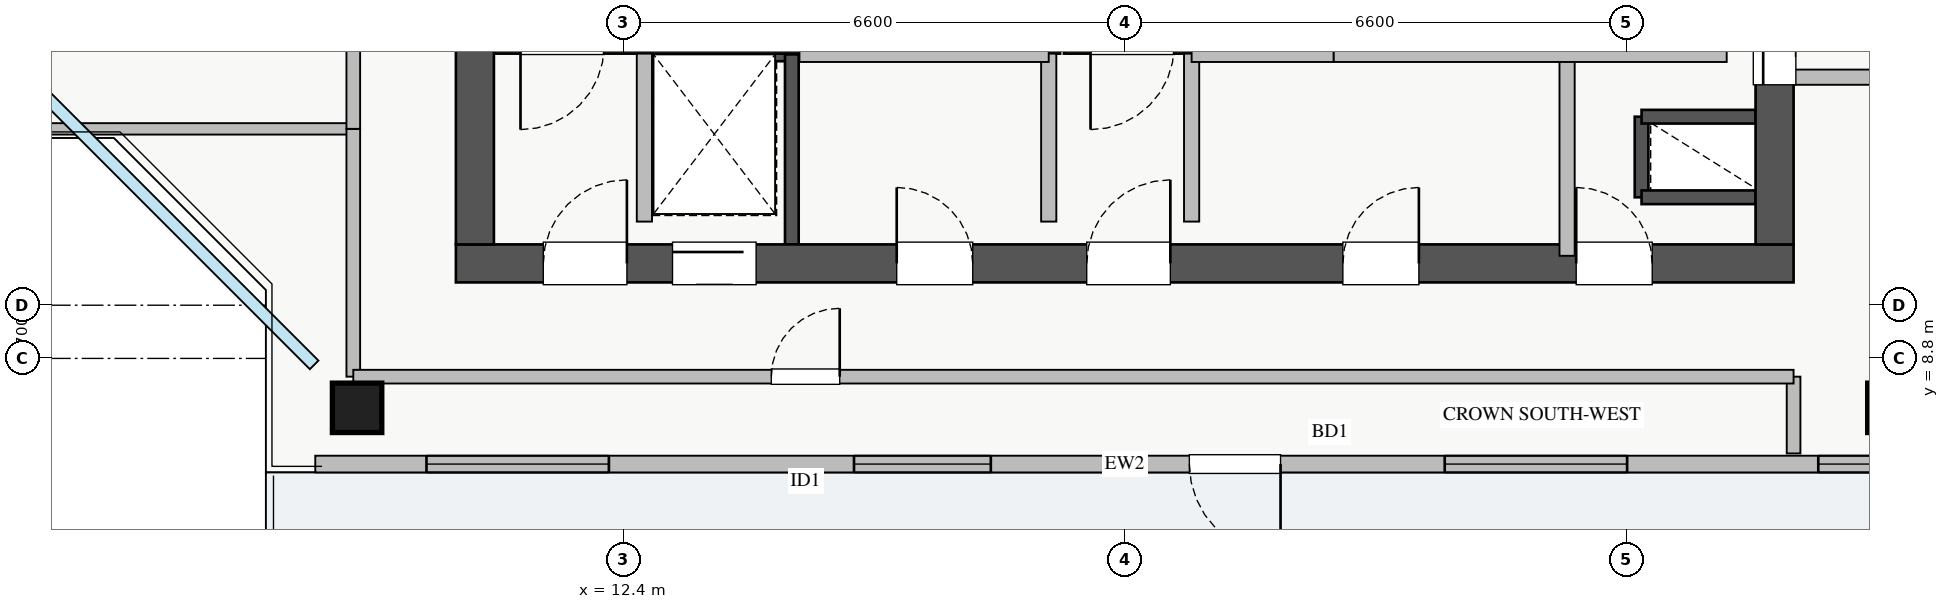
"""IFC4 building model, lengths in metres.
Left out: names, types, materials, properties, quantities, classifications, styles, units other than length and angle.
Written with IfcOpenShell. Run it as: python <this file> out.ifc"""

import sys

from ifc_helpers import new_model, si_unit, direction, frame, frame_2d, origin, origin_2d, place, context, subcontext, project, spatial, rectangle, extrude, source, transform, mapped, element, fill, save


model = new_model("IFC4")
c1 = context("Model", 3, precision=1e-05, world=origin(), true_north=direction((0.0, 1.0)))
c2 = subcontext(c1, "Body", "Model", "MODEL_VIEW")
j1 = project(units=[si_unit("LENGTHUNIT", "METRE"), si_unit("PLANEANGLEUNIT", "RADIAN")], contexts=[c1])
p1 = place(None, origin())
s1 = spatial("IfcSite", under=j1, at=p1, CompositionType="ELEMENT")
p2 = place(p1, origin())
s2 = spatial("IfcBuilding", under=s1, at=p2, CompositionType="ELEMENT")
p3 = place(p2, frame((0.0, 0.0, 237.25)))
s3 = spatial("IfcBuildingStorey", under=s2, at=p3, CompositionType="ELEMENT", Elevation=237.25)
p4 = place(p3, frame((12.68, 12.8, 0.0), z_axis=(0.0, 0.0, 1.0), x_axis=(1.0, 0.0, 0.0)))
e1 = element("IfcWall", 1, at=p4, inside=s3, PredefinedType="SHEAR", context=c2, shape_type="SweptSolid", body=[
    extrude(rectangle(XDim=1.94, YDim=0.18, at=frame_2d((0.97, 0.0))), origin(), (0.0, 0.0, 1.0), 3.07),
])
p5 = place(p3, frame((14.62, 10.3, 0.0), z_axis=(0.0, 0.0, 1.0), x_axis=(0.0, 1.0, 0.0)))
e2 = element("IfcWall", 2, at=p5, inside=s3, PredefinedType="SHEAR", context=c2, shape_type="SweptSolid", body=[
    extrude(rectangle(XDim=2.5, YDim=0.18, at=frame_2d((1.25, 0.0))), origin(), (0.0, 0.0, 1.0), 3.07),
])
p6 = place(p3, frame((25.8, 10.92, 0.0), z_axis=(0.0, 0.0, 1.0), x_axis=(0.0, 1.0, 0.0)))
e3 = element("IfcWall", 3, at=p6, inside=s3, PredefinedType="SHEAR", context=c2, shape_type="SweptSolid", body=[
    extrude(rectangle(XDim=1.06, YDim=0.18, at=frame_2d((0.53, 0.0))), origin(), (0.0, 0.0, 1.0), 3.07),
])
for number, where, z_axis, x_axis in (
    (4, (25.8, 11.98, 0.0), (0.0, 0.0, 1.0), (1.0, 0.0, 0.0)),
    (5, (25.8, 10.92, 0.0), (0.0, 0.0, 1.0), (1.0, 0.0, 0.0)),
):
    element("IfcWall", number, at=place(p3, frame(where, z_axis=z_axis, x_axis=x_axis)), inside=s3, PredefinedType="SHEAR", context=c2, shape_type="SweptSolid", body=[
        extrude(rectangle(XDim=1.5, YDim=0.18, at=frame_2d((0.75, 0.0))), origin(), (0.0, 0.0, 1.0), 3.07),
    ])
p7 = place(p3, frame((10.7, 12.91, 0.0), z_axis=(0.0, 0.0, 1.0), x_axis=(1.0, 0.0, 0.0)))
e6 = element("IfcWall", 6, at=p7, inside=s3, PredefinedType="SHEAR", context=c2, shape_type="SweptSolid", body=[
    extrude(rectangle(XDim=7.45, YDim=0.2, at=frame_2d((3.725, 0.0))), origin(), (0.0, 0.0, 1.0), 3.25),
])
p8 = place(p7, frame((0.35, 0.0, 0.0)))
e7 = element("IfcOpeningElement", 7, at=p8, cuts=e6, PredefinedType="OPENING", context=c2, shape_type="SweptSolid", body=[
    extrude(rectangle(XDim=1.1, YDim=2.05, at=frame_2d((0.55, 1.025))), frame((0.0, 0.11, 0.0), z_axis=(0.0, -1.0, 0.0), x_axis=(1.0, 0.0, 0.0)), (0.0, 0.0, 1.0), 0.22),
])
p9 = place(p3, frame((18.2, 12.91, 0.0), z_axis=(0.0, 0.0, 1.0), x_axis=(1.0, 0.0, 0.0)))
e8 = element("IfcWall", 8, at=p9, inside=s3, PredefinedType="SHEAR", context=c2, shape_type="SweptSolid", body=[
    extrude(rectangle(XDim=7.15, YDim=0.2, at=frame_2d((3.575, 0.0))), origin(), (0.0, 0.0, 1.0), 3.25),
])
p10 = place(p9, frame((0.35, 0.0, 0.0)))
e9 = element("IfcOpeningElement", 9, at=p10, cuts=e8, PredefinedType="OPENING", context=c2, shape_type="SweptSolid", body=[
    extrude(rectangle(XDim=1.1, YDim=2.05, at=frame_2d((0.55, 1.025))), frame((0.0, 0.11, 0.0), z_axis=(0.0, -1.0, 0.0), x_axis=(1.0, 0.0, 0.0)), (0.0, 0.0, 1.0), 0.22),
])
p11 = place(p3, frame((10.2, 10.05, 0.0), z_axis=(0.0, 0.0, 1.0), x_axis=(1.0, 0.0, 0.0)))
e10 = element("IfcWall", 10, at=p11, inside=s3, PredefinedType="SHEAR", context=c2, shape_type="SweptSolid", body=[
    extrude(rectangle(XDim=17.6, YDim=0.5, at=frame_2d((8.8, 0.0))), origin(), (0.0, 0.0, 1.0), 3.25),
])
p12 = place(p11, frame((1.15, 0.0, 0.0)))
e11 = element("IfcOpeningElement", 11, at=p12, cuts=e10, PredefinedType="OPENING", context=c2, shape_type="SweptSolid", body=[
    extrude(rectangle(XDim=1.1, YDim=2.05, at=frame_2d((0.55, 1.025))), frame((0.0, 0.26, 0.0), z_axis=(0.0, -1.0, 0.0), x_axis=(1.0, 0.0, 0.0)), (0.0, 0.0, 1.0), 0.52),
])
p13 = place(p11, frame((8.3, 0.0, 0.0)))
e12 = element("IfcOpeningElement", 12, at=p13, cuts=e10, PredefinedType="OPENING", context=c2, shape_type="SweptSolid", body=[
    extrude(rectangle(XDim=1.1, YDim=2.05, at=frame_2d((0.55, 1.025))), frame((0.0, 0.26, 0.0), z_axis=(0.0, -1.0, 0.0), x_axis=(1.0, 0.0, 0.0)), (0.0, 0.0, 1.0), 0.52),
])
p14 = place(p11, frame((2.85, 0.0, 0.0)))
e13 = element("IfcOpeningElement", 13, at=p14, cuts=e10, PredefinedType="OPENING", context=c2, shape_type="SweptSolid", body=[
    extrude(rectangle(XDim=1.1, YDim=2.05, at=frame_2d((0.55, 1.025))), frame((0.0, 0.26, 0.0), z_axis=(0.0, -1.0, 0.0), x_axis=(1.0, 0.0, 0.0)), (0.0, 0.0, 1.0), 0.52),
])
p15 = place(p11, frame((5.8, 0.0, 0.0)))
e14 = element("IfcOpeningElement", 14, at=p15, cuts=e10, PredefinedType="OPENING", context=c2, shape_type="SweptSolid", body=[
    extrude(rectangle(XDim=1.0, YDim=2.05, at=frame_2d((0.5, 1.025))), frame((0.0, 0.26, 0.0), z_axis=(0.0, -1.0, 0.0), x_axis=(1.0, 0.0, 0.0)), (0.0, 0.0, 1.0), 0.52),
])
p16 = place(p11, frame((14.74, 0.0, 0.0)))
e15 = element("IfcOpeningElement", 15, at=p16, cuts=e10, PredefinedType="OPENING", context=c2, shape_type="SweptSolid", body=[
    extrude(rectangle(XDim=1.0, YDim=2.05, at=frame_2d((0.5, 1.025))), frame((0.0, 0.26, 0.0), z_axis=(0.0, -1.0, 0.0), x_axis=(1.0, 0.0, 0.0)), (0.0, 0.0, 1.0), 0.52),
])
p17 = place(p11, frame((11.67, 0.0, 0.0)))
e16 = element("IfcOpeningElement", 16, at=p17, cuts=e10, PredefinedType="OPENING", context=c2, shape_type="SweptSolid", body=[
    extrude(rectangle(XDim=1.0, YDim=2.05, at=frame_2d((0.5, 1.025))), frame((0.0, 0.26, 0.0), z_axis=(0.0, -1.0, 0.0), x_axis=(1.0, 0.0, 0.0)), (0.0, 0.0, 1.0), 0.52),
])
p18 = place(p3, frame((10.45, 10.3, 0.0), z_axis=(0.0, 0.0, 1.0), x_axis=(0.0, 1.0, 0.0)))
e17 = element("IfcWall", 17, at=p18, inside=s3, PredefinedType="SHEAR", context=c2, shape_type="SweptSolid", body=[
    extrude(rectangle(XDim=6.2, YDim=0.5, at=frame_2d((3.1, 0.0))), origin(), (0.0, 0.0, 1.0), 3.25),
])
p19 = place(p3, frame((27.55, 10.3, 0.0), z_axis=(0.0, 0.0, 1.0), x_axis=(0.0, 1.0, 0.0)))
e18 = element("IfcWall", 18, at=p19, inside=s3, PredefinedType="SHEAR", context=c2, shape_type="SweptSolid", body=[
    extrude(rectangle(XDim=6.2, YDim=0.5, at=frame_2d((3.1, 0.0))), origin(), (0.0, 0.0, 1.0), 3.25),
])
p20 = place(p19, frame((2.1, 0.0, 0.0)))
e19 = element("IfcOpeningElement", 19, at=p20, cuts=e18, PredefinedType="OPENING", context=c2, shape_type="SweptSolid", body=[
    extrude(rectangle(XDim=1.3, YDim=2.05, at=frame_2d((0.65, 1.025))), frame((0.0, 0.26, 0.0), z_axis=(0.0, -1.0, 0.0), x_axis=(1.0, 0.0, 0.0)), (0.0, 0.0, 1.0), 0.52),
])
m1 = source(origin(), c2, "Body", "SweptSolid", [
    extrude(rectangle(XDim=0.65, YDim=0.65, at=origin_2d()), origin(), (0.0, 0.0, 1.0), 3.25),
])
for number, where, z_axis, x_axis in (
    (20, (8.9, 8.15, 0.0), (0.0, 0.0, 1.0), (1.0, 0.0, 0.0)),
    (21, (29.1, 8.15, 0.0), (0.0, 0.0, 1.0), (1.0, 0.0, 0.0)),
):
    element("IfcColumn", number, at=place(p3, frame(where, z_axis=z_axis, x_axis=x_axis)), inside=s3, PredefinedType="COLUMN", context=c2, shape_type="MappedRepresentation", body=[
        mapped(m1, transform((0.0, 0.0, 0.0), x_axis=(1.0, 0.0, 0.0), y_axis=(0.0, 1.0, 0.0), z_axis=(0.0, 0.0, 1.0), scale=1.0)),
    ])
p21 = place(p3, frame((8.35, 7.41, 0.0), z_axis=(0.0, 0.0, 1.0), x_axis=(1.0, 0.0, 0.0)))
e22 = element("IfcWall", 22, at=p21, inside=s3, PredefinedType="STANDARD", context=c2, shape_type="SweptSolid", body=[
    extrude(rectangle(XDim=21.3, YDim=0.22, at=frame_2d((10.65, 0.0))), origin(), (0.0, 0.0, 1.0), 2.61),
])
p22 = place(p21, frame((11.5, 0.0, 0.0)))
e23 = element("IfcOpeningElement", 23, at=p22, cuts=e22, PredefinedType="OPENING", context=c2, shape_type="SweptSolid", body=[
    extrude(rectangle(XDim=1.2, YDim=2.1, at=frame_2d((0.6, 1.05))), frame((0.0, 0.12, 0.0), z_axis=(0.0, -1.0, 0.0), x_axis=(1.0, 0.0, 0.0)), (0.0, 0.0, 1.0), 0.24),
])
p23 = place(p21, frame((1.463, 0.0, 0.9)))
e24 = element("IfcOpeningElement", 24, at=p23, cuts=e22, PredefinedType="OPENING", context=c2, shape_type="SweptSolid", body=[
    extrude(rectangle(XDim=2.4, YDim=1.48, at=frame_2d((1.2, 0.74))), frame((0.0, 0.12, 0.0), z_axis=(0.0, -1.0, 0.0), x_axis=(1.0, 0.0, 0.0)), (0.0, 0.0, 1.0), 0.24),
])
p24 = place(p21, frame((7.088, 0.0, 0.9)))
e25 = element("IfcOpeningElement", 25, at=p24, cuts=e22, PredefinedType="OPENING", context=c2, shape_type="SweptSolid", body=[
    extrude(rectangle(XDim=1.8, YDim=1.45, at=frame_2d((0.9, 0.725))), frame((0.0, 0.12, 0.0), z_axis=(0.0, -1.0, 0.0), x_axis=(1.0, 0.0, 0.0)), (0.0, 0.0, 1.0), 0.24),
])
p25 = place(p21, frame((19.775, 0.0, 0.9)))
e26 = element("IfcOpeningElement", 26, at=p25, cuts=e22, PredefinedType="OPENING", context=c2, shape_type="SweptSolid", body=[
    extrude(rectangle(XDim=1.2, YDim=1.4, at=frame_2d((0.6, 0.7))), frame((0.0, 0.12, 0.0), z_axis=(0.0, -1.0, 0.0), x_axis=(1.0, 0.0, 0.0)), (0.0, 0.0, 1.0), 0.24),
])
p26 = place(p21, frame((14.86, 0.0, 0.9)))
e27 = element("IfcOpeningElement", 27, at=p26, cuts=e22, PredefinedType="OPENING", context=c2, shape_type="SweptSolid", body=[
    extrude(rectangle(XDim=2.4, YDim=1.5, at=frame_2d((1.2, 0.75))), frame((0.0, 0.12, 0.0), z_axis=(0.0, -1.0, 0.0), x_axis=(1.0, 0.0, 0.0)), (0.0, 0.0, 1.0), 0.24),
])
p27 = place(p3, frame((27.8, 12.5, 0.0), z_axis=(0.0, 0.0, 1.0), x_axis=(1.0, 0.0, 0.0)))
e28 = element("IfcWall", 28, at=p27, inside=s3, PredefinedType="PARTITIONING", context=c2, shape_type="SweptSolid", body=[
    extrude(rectangle(XDim=3.1, YDim=0.2, at=frame_2d((1.55, 0.0))), origin(), (0.0, 0.0, 1.0), 3.07),
])
for number, where, z_axis, x_axis in (
    (29, (12.68, 10.6, 0.0), (0.0, 0.0, 1.0), (0.0, 1.0, 0.0)),
    (30, (18.0, 10.6, 0.0), (0.0, 0.0, 1.0), (0.0, 1.0, 0.0)),
    (31, (19.88, 10.6, 0.0), (0.0, 0.0, 1.0), (0.0, 1.0, 0.0)),
):
    element("IfcWall", number, at=place(p3, frame(where, z_axis=z_axis, x_axis=x_axis)), inside=s3, PredefinedType="PARTITIONING", context=c2, shape_type="SweptSolid", body=[
        extrude(rectangle(XDim=2.21, YDim=0.2, at=frame_2d((1.105, 0.0))), origin(), (0.0, 0.0, 1.0), 3.07),
    ])
p28 = place(p3, frame((14.72, 12.8, 0.0), z_axis=(0.0, 0.0, 1.0), x_axis=(1.0, 0.0, 0.0)))
e32 = element("IfcWall", 32, at=p28, inside=s3, PredefinedType="PARTITIONING", context=c2, shape_type="SweptSolid", body=[
    extrude(rectangle(XDim=3.28, YDim=0.2, at=frame_2d((1.64, 0.0))), origin(), (0.0, 0.0, 1.0), 3.07),
])
p29 = place(p3, frame((24.82, 10.15, 0.0), z_axis=(0.0, 0.0, 1.0), x_axis=(0.0, 1.0, 0.0)))
e33 = element("IfcWall", 33, at=p29, inside=s3, PredefinedType="PARTITIONING", context=c2, shape_type="SweptSolid", body=[
    extrude(rectangle(XDim=2.65, YDim=0.2, at=frame_2d((1.325, 0.0))), origin(), (0.0, 0.0, 1.0), 3.07),
])
p30 = place(p3, frame((19.88, 12.8, 0.0), z_axis=(0.0, 0.0, 1.0), x_axis=(1.0, 0.0, 0.0)))
e34 = element("IfcWall", 34, at=p30, inside=s3, PredefinedType="PARTITIONING", context=c2, shape_type="SweptSolid", body=[
    extrude(rectangle(XDim=1.87, YDim=0.2, at=frame_2d((0.935, 0.0))), origin(), (0.0, 0.0, 1.0), 3.07),
])
p31 = place(p3, frame((21.75, 12.8, 0.0), z_axis=(0.0, 0.0, 1.0), x_axis=(1.0, 0.0, 0.0)))
e35 = element("IfcWall", 35, at=p31, inside=s3, PredefinedType="PARTITIONING", context=c2, shape_type="SweptSolid", body=[
    extrude(rectangle(XDim=5.17, YDim=0.2, at=frame_2d((2.585, 0.0))), origin(), (0.0, 0.0, 1.0), 3.07),
])
p32 = place(p3, frame((3.55, 11.82, 0.0), z_axis=(0.0, 0.0, 1.0), x_axis=(1.0, 0.0, 0.0)))
e36 = element("IfcWall", 36, at=p32, inside=s3, PredefinedType="PARTITIONING", context=c2, shape_type="SweptSolid", body=[
    extrude(rectangle(XDim=5.3, YDim=0.15, at=frame_2d((2.65, 0.0))), origin(), (0.0, 0.0, 1.0), 3.07),
])
p33 = place(p3, frame((27.8, 7.55, 0.0), z_axis=(0.0, 0.0, 1.0), x_axis=(0.0, 1.0, 0.0)))
e37 = element("IfcWall", 37, at=p33, inside=s3, PredefinedType="PARTITIONING", context=c2, shape_type="SweptSolid", body=[
    extrude(rectangle(XDim=1.01, YDim=0.18, at=frame_2d((0.505, 0.0))), origin(), (0.0, 0.0, 1.0), 3.07),
])
p34 = place(p3, frame((8.85, 8.56, 0.0), z_axis=(0.0, 0.0, 1.0), x_axis=(0.0, 1.0, 0.0)))
e38 = element("IfcWall", 38, at=p34, inside=s3, PredefinedType="PARTITIONING", context=c2, shape_type="SweptSolid", body=[
    extrude(rectangle(XDim=3.26, YDim=0.18, at=frame_2d((1.63, 0.0))), origin(), (0.0, 0.0, 1.0), 2.569),
])
p35 = place(p3, frame((8.85, 8.56, 0.0), z_axis=(0.0, 0.0, 1.0), x_axis=(1.0, 0.0, 0.0)))
e39 = element("IfcWall", 39, at=p35, inside=s3, PredefinedType="PARTITIONING", context=c2, shape_type="SweptSolid", body=[
    extrude(rectangle(XDim=18.95, YDim=0.18, at=frame_2d((9.475, 0.0))), origin(), (0.0, 0.0, 1.0), 3.07),
])
p36 = place(p35, frame((5.5, 0.0, 0.0)))
e40 = element("IfcOpeningElement", 40, at=p36, cuts=e39, PredefinedType="OPENING", context=c2, shape_type="SweptSolid", body=[
    extrude(rectangle(XDim=0.9, YDim=2.05, at=frame_2d((0.45, 1.025))), frame((0.0, 0.1, 0.0), z_axis=(0.0, -1.0, 0.0), x_axis=(1.0, 0.0, 0.0)), (0.0, 0.0, 1.0), 0.2),
])
p37 = place(p3, frame((8.85, 11.82, 0.0), z_axis=(0.0, 0.0, 1.0), x_axis=(0.0, 1.0, 0.0)))
e41 = element("IfcWall", 41, at=p37, inside=s3, PredefinedType="PARTITIONING", context=c2, shape_type="SweptSolid", body=[
    extrude(rectangle(XDim=22.36, YDim=0.18, at=frame_2d((11.18, 0.0))), origin(), (0.0, 0.0, 1.0), 2.569),
])
p38 = place(p37, frame((4.42, 0.0, 0.0)))
e42 = element("IfcOpeningElement", 42, at=p38, cuts=e41, PredefinedType="OPENING", context=c2, shape_type="SweptSolid", body=[
    extrude(rectangle(XDim=1.0, YDim=2.05, at=frame_2d((0.5, 1.025))), frame((0.0, 0.1, 0.0), z_axis=(0.0, -1.0, 0.0), x_axis=(1.0, 0.0, 0.0)), (0.0, 0.0, 1.0), 0.2),
])
p39 = place(p37, frame((12.695, 0.0, 0.0)))
e43 = element("IfcOpeningElement", 43, at=p39, cuts=e41, PredefinedType="OPENING", context=c2, shape_type="SweptSolid", body=[
    extrude(rectangle(XDim=1.0, YDim=2.05, at=frame_2d((0.5, 1.025))), frame((0.0, 0.1, 0.0), z_axis=(0.0, -1.0, 0.0), x_axis=(1.0, 0.0, 0.0)), (0.0, 0.0, 1.0), 0.2),
])
p40 = place(p37, frame((18.955, 0.0, 0.0)))
e44 = element("IfcOpeningElement", 44, at=p40, cuts=e41, PredefinedType="OPENING", context=c2, shape_type="SweptSolid", body=[
    extrude(rectangle(XDim=1.0, YDim=2.05, at=frame_2d((0.5, 1.025))), frame((0.0, 0.1, 0.0), z_axis=(0.0, -1.0, 0.0), x_axis=(1.0, 0.0, 0.0)), (0.0, 0.0, 1.0), 0.2),
])
m2 = source(origin(), c2, "Body", "SweptSolid", [
    extrude(rectangle(XDim=1.2, YDim=2.1, at=frame_2d((0.6, 1.05))), frame((0.0, 0.025, 0.0), z_axis=(0.0, -1.0, 0.0), x_axis=(1.0, 0.0, 0.0)), (0.0, 0.0, 1.0), 0.05),
])
p41 = place(p22, frame((1.2, 0.0, 0.0), z_axis=(0.0, 0.0, 1.0), x_axis=(-1.0, 0.0, 0.0)))
e45 = element("IfcDoor", 45, at=p41, inside=s3, OperationType="SINGLE_SWING_RIGHT", PredefinedType="DOOR", context=c2, shape_type="MappedRepresentation", body=[
    mapped(m2, transform((0.0, 0.0, 0.0), x_axis=(1.0, 0.0, 0.0), y_axis=(0.0, 1.0, 0.0), z_axis=(0.0, 0.0, 1.0), scale=1.0)),
])
fill(e23, e45)
m3 = source(origin(), c2, "Body", "SweptSolid", [
    extrude(rectangle(XDim=2.4, YDim=1.48, at=frame_2d((1.2, 0.74))), frame((0.0, 0.03, 0.0), z_axis=(0.0, -1.0, 0.0), x_axis=(1.0, 0.0, 0.0)), (0.0, 0.0, 1.0), 0.06),
])
p42 = place(p23, origin())
e46 = element("IfcWindow", 46, at=p42, inside=s3, PartitioningType="TRIPLE_PANEL_VERTICAL", PredefinedType="WINDOW", context=c2, shape_type="MappedRepresentation", body=[
    mapped(m3, transform((0.0, 0.0, 0.0), x_axis=(1.0, 0.0, 0.0), y_axis=(0.0, 1.0, 0.0), z_axis=(0.0, 0.0, 1.0), scale=1.0)),
])
fill(e24, e46)
m4 = source(origin(), c2, "Body", "SweptSolid", [
    extrude(rectangle(XDim=1.8, YDim=1.45, at=frame_2d((0.9, 0.725))), frame((0.0, 0.03, 0.0), z_axis=(0.0, -1.0, 0.0), x_axis=(1.0, 0.0, 0.0)), (0.0, 0.0, 1.0), 0.06),
])
p43 = place(p24, origin())
e47 = element("IfcWindow", 47, at=p43, inside=s3, PartitioningType="DOUBLE_PANEL_VERTICAL", PredefinedType="WINDOW", context=c2, shape_type="MappedRepresentation", body=[
    mapped(m4, transform((0.0, 0.0, 0.0), x_axis=(1.0, 0.0, 0.0), y_axis=(0.0, 1.0, 0.0), z_axis=(0.0, 0.0, 1.0), scale=1.0)),
])
fill(e25, e47)
m5 = source(origin(), c2, "Body", "SweptSolid", [
    extrude(rectangle(XDim=1.2, YDim=1.4, at=frame_2d((0.6, 0.7))), frame((0.0, 0.03, 0.0), z_axis=(0.0, -1.0, 0.0), x_axis=(1.0, 0.0, 0.0)), (0.0, 0.0, 1.0), 0.06),
])
p44 = place(p25, origin())
e48 = element("IfcWindow", 48, at=p44, inside=s3, PartitioningType="TRIPLE_PANEL_VERTICAL", PredefinedType="WINDOW", context=c2, shape_type="MappedRepresentation", body=[
    mapped(m5, transform((0.0, 0.0, 0.0), x_axis=(1.0, 0.0, 0.0), y_axis=(0.0, 1.0, 0.0), z_axis=(0.0, 0.0, 1.0), scale=1.0)),
])
fill(e26, e48)
m6 = source(origin(), c2, "Body", "SweptSolid", [
    extrude(rectangle(XDim=1.3, YDim=2.05, at=frame_2d((0.65, 1.025))), frame((0.0, 0.025, 0.0), z_axis=(0.0, -1.0, 0.0), x_axis=(1.0, 0.0, 0.0)), (0.0, 0.0, 1.0), 0.05),
])
p45 = place(p20, origin())
e49 = element("IfcDoor", 49, at=p45, inside=s3, OperationType="SLIDING_TO_RIGHT", PredefinedType="DOOR", context=c2, shape_type="MappedRepresentation", body=[
    mapped(m6, transform((0.0, 0.0, 0.0), x_axis=(1.0, 0.0, 0.0), y_axis=(0.0, 1.0, 0.0), z_axis=(0.0, 0.0, 1.0), scale=1.0)),
])
fill(e19, e49)
m7 = source(origin(), c2, "Body", "SweptSolid", [
    extrude(rectangle(XDim=1.1, YDim=2.05, at=frame_2d((0.55, 1.025))), frame((0.0, 0.025, 0.0), z_axis=(0.0, -1.0, 0.0), x_axis=(1.0, 0.0, 0.0)), (0.0, 0.0, 1.0), 0.05),
])
p46 = place(p12, origin())
e50 = element("IfcDoor", 50, at=p46, inside=s3, OperationType="SINGLE_SWING_RIGHT", PredefinedType="DOOR", context=c2, shape_type="MappedRepresentation", body=[
    mapped(m7, transform((0.0, 0.0, 0.0), x_axis=(1.0, 0.0, 0.0), y_axis=(0.0, 1.0, 0.0), z_axis=(0.0, 0.0, 1.0), scale=1.0)),
])
fill(e11, e50)
p47 = place(p13, origin())
e51 = element("IfcDoor", 51, at=p47, inside=s3, OperationType="SINGLE_SWING_RIGHT", PredefinedType="DOOR", context=c2, shape_type="MappedRepresentation", body=[
    mapped(m7, transform((0.0, 0.0, 0.0), x_axis=(1.0, 0.0, 0.0), y_axis=(0.0, 1.0, 0.0), z_axis=(0.0, 0.0, 1.0), scale=1.0)),
])
fill(e12, e51)
p48 = place(p14, origin())
e52 = element("IfcDoor", 52, at=p48, inside=s3, OperationType="SLIDING_TO_RIGHT", PredefinedType="DOOR", context=c2, shape_type="MappedRepresentation", body=[
    mapped(m7, transform((0.0, 0.0, 0.0), x_axis=(1.0, 0.0, 0.0), y_axis=(0.0, 1.0, 0.0), z_axis=(0.0, 0.0, 1.0), scale=1.0)),
])
fill(e13, e52)
m8 = source(origin(), c2, "Body", "SweptSolid", [
    extrude(rectangle(XDim=1.0, YDim=2.05, at=frame_2d((0.5, 1.025))), frame((0.0, 0.025, 0.0), z_axis=(0.0, -1.0, 0.0), x_axis=(1.0, 0.0, 0.0)), (0.0, 0.0, 1.0), 0.05),
])
p49 = place(p15, origin())
e53 = element("IfcDoor", 53, at=p49, inside=s3, OperationType="SINGLE_SWING_LEFT", PredefinedType="DOOR", context=c2, shape_type="MappedRepresentation", body=[
    mapped(m8, transform((0.0, 0.0, 0.0), x_axis=(1.0, 0.0, 0.0), y_axis=(0.0, 1.0, 0.0), z_axis=(0.0, 0.0, 1.0), scale=1.0)),
])
fill(e14, e53)
p50 = place(p16, origin())
e54 = element("IfcDoor", 54, at=p50, inside=s3, OperationType="SINGLE_SWING_LEFT", PredefinedType="DOOR", context=c2, shape_type="MappedRepresentation", body=[
    mapped(m8, transform((0.0, 0.0, 0.0), x_axis=(1.0, 0.0, 0.0), y_axis=(0.0, 1.0, 0.0), z_axis=(0.0, 0.0, 1.0), scale=1.0)),
])
fill(e15, e54)
p51 = place(p17, origin())
e55 = element("IfcDoor", 55, at=p51, inside=s3, OperationType="SINGLE_SWING_RIGHT", PredefinedType="DOOR", context=c2, shape_type="MappedRepresentation", body=[
    mapped(m8, transform((0.0, 0.0, 0.0), x_axis=(1.0, 0.0, 0.0), y_axis=(0.0, 1.0, 0.0), z_axis=(0.0, 0.0, 1.0), scale=1.0)),
])
fill(e16, e55)
m9 = source(origin(), c2, "Body", "SweptSolid", [
    extrude(rectangle(XDim=0.9, YDim=2.05, at=frame_2d((0.45, 1.025))), frame((0.0, 0.025, 0.0), z_axis=(0.0, -1.0, 0.0), x_axis=(1.0, 0.0, 0.0)), (0.0, 0.0, 1.0), 0.05),
])
p52 = place(p36, origin())
e56 = element("IfcDoor", 56, at=p52, inside=s3, OperationType="SINGLE_SWING_RIGHT", PredefinedType="DOOR", context=c2, shape_type="MappedRepresentation", body=[
    mapped(m9, transform((0.0, 0.0, 0.0), x_axis=(1.0, 0.0, 0.0), y_axis=(0.0, 1.0, 0.0), z_axis=(0.0, 0.0, 1.0), scale=1.0)),
])
fill(e40, e56)
m10 = source(origin(), c2, "Body", "SweptSolid", [
    extrude(rectangle(XDim=2.4, YDim=1.5, at=frame_2d((1.2, 0.75))), frame((0.0, 0.03, 0.0), z_axis=(0.0, -1.0, 0.0), x_axis=(1.0, 0.0, 0.0)), (0.0, 0.0, 1.0), 0.06),
])
p53 = place(p26, origin())
e57 = element("IfcWindow", 57, at=p53, inside=s3, PartitioningType="TRIPLE_PANEL_VERTICAL", PredefinedType="WINDOW", context=c2, shape_type="MappedRepresentation", body=[
    mapped(m10, transform((0.0, 0.0, 0.0), x_axis=(1.0, 0.0, 0.0), y_axis=(0.0, 1.0, 0.0), z_axis=(0.0, 0.0, 1.0), scale=1.0)),
])
fill(e27, e57)
save(model, sys.argv[1])
